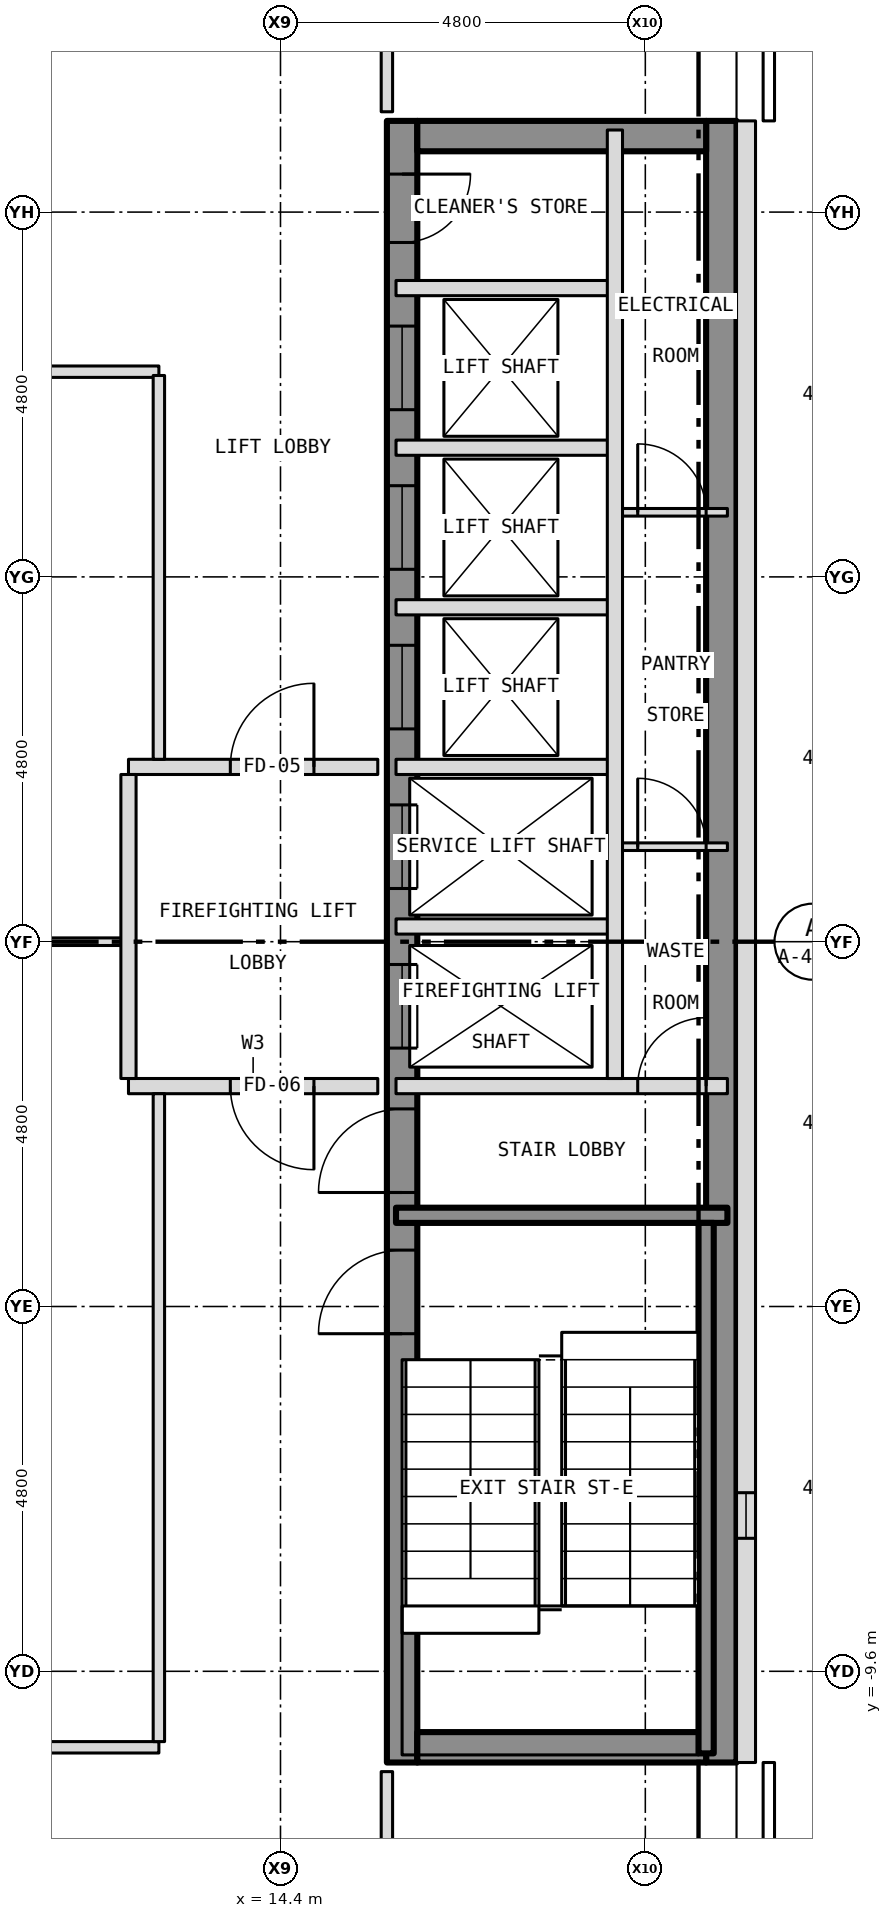
"""IFC4 building model, lengths in metres.
Left out: names, types, materials, properties, quantities, classifications, styles, units other than length and angle.
Written with IfcOpenShell. Run it as: python <this file> out.ifc"""

import sys

from ifc_helpers import new_model, si_unit, direction, frame, frame_2d, origin, place, context, subcontext, project, spatial, rectangle, extrude, element, fill, save


model = new_model("IFC4")
c1 = context("Model", 3, precision=1e-05, world=origin(), true_north=direction((0.0, 1.0)))
c2 = subcontext(c1, "Body", "Model", "MODEL_VIEW")
j1 = project(units=[si_unit("LENGTHUNIT", "METRE"), si_unit("PLANEANGLEUNIT", "RADIAN")], contexts=[c1])
p1 = place(None, origin())
s1 = spatial("IfcSite", under=j1, at=p1, CompositionType="ELEMENT")
p2 = place(p1, origin())
s2 = spatial("IfcBuilding", under=s1, at=p2, CompositionType="ELEMENT")
p3 = place(p2, frame((0.0, 0.0, 205.0)))
s3 = spatial("IfcBuildingStorey", under=s2, at=p3, CompositionType="ELEMENT", Elevation=205.0)
p4 = place(p3, frame((16.0, -10.8, 0.0), z_axis=(0.0, 0.0, 1.0), x_axis=(0.0, 1.0, 0.0)))
e1 = element("IfcWall", 1, at=p4, inside=s3, PredefinedType="SHEAR", context=c2, shape_type="SweptSolid", body=[
    extrude(rectangle(XDim=21.6, YDim=0.4, at=frame_2d((10.8, 0.0))), origin(), (0.0, 0.0, 1.0), 3.25),
])
p5 = place(p4, frame((9.4, 0.0, 0.0)))
e2 = element("IfcOpeningElement", 2, at=p5, cuts=e1, PredefinedType="OPENING", context=c2, shape_type="SweptSolid", body=[
    extrude(rectangle(XDim=1.1, YDim=2.1, at=frame_2d((0.55, 1.05))), frame((0.0, 0.212, 0.0), z_axis=(0.0, -1.0, 0.0), x_axis=(1.0, 0.0, 0.0)), (0.0, 0.0, 1.0), 0.424),
])
p6 = place(p4, frame((11.5, 0.0, 0.0)))
e3 = element("IfcOpeningElement", 3, at=p6, cuts=e1, PredefinedType="OPENING", context=c2, shape_type="SweptSolid", body=[
    extrude(rectangle(XDim=1.1, YDim=2.1, at=frame_2d((0.55, 1.05))), frame((0.0, 0.212, 0.0), z_axis=(0.0, -1.0, 0.0), x_axis=(1.0, 0.0, 0.0)), (0.0, 0.0, 1.0), 0.424),
])
p7 = place(p4, frame((13.6, 0.0, 0.0)))
e4 = element("IfcOpeningElement", 4, at=p7, cuts=e1, PredefinedType="OPENING", context=c2, shape_type="SweptSolid", body=[
    extrude(rectangle(XDim=1.1, YDim=2.1, at=frame_2d((0.55, 1.05))), frame((0.0, 0.212, 0.0), z_axis=(0.0, -1.0, 0.0), x_axis=(1.0, 0.0, 0.0)), (0.0, 0.0, 1.0), 0.424),
])
p8 = place(p4, frame((15.7, 0.0, 0.0)))
e5 = element("IfcOpeningElement", 5, at=p8, cuts=e1, PredefinedType="OPENING", context=c2, shape_type="SweptSolid", body=[
    extrude(rectangle(XDim=1.1, YDim=2.1, at=frame_2d((0.55, 1.05))), frame((0.0, 0.212, 0.0), z_axis=(0.0, -1.0, 0.0), x_axis=(1.0, 0.0, 0.0)), (0.0, 0.0, 1.0), 0.424),
])
p9 = place(p4, frame((17.8, 0.0, 0.0)))
e6 = element("IfcOpeningElement", 6, at=p9, cuts=e1, PredefinedType="OPENING", context=c2, shape_type="SweptSolid", body=[
    extrude(rectangle(XDim=1.1, YDim=2.1, at=frame_2d((0.55, 1.05))), frame((0.0, 0.212, 0.0), z_axis=(0.0, -1.0, 0.0), x_axis=(1.0, 0.0, 0.0)), (0.0, 0.0, 1.0), 0.424),
])
p10 = place(p4, frame((5.642, 0.0, 0.0)))
e7 = element("IfcOpeningElement", 7, at=p10, cuts=e1, PredefinedType="OPENING", context=c2, shape_type="SweptSolid", body=[
    extrude(rectangle(XDim=1.1, YDim=2.1, at=frame_2d((0.55, 1.05))), frame((0.0, 0.212, 0.0), z_axis=(0.0, -1.0, 0.0), x_axis=(1.0, 0.0, 0.0)), (0.0, 0.0, 1.0), 0.424),
])
p11 = place(p4, frame((7.5, 0.0, 0.0)))
e8 = element("IfcOpeningElement", 8, at=p11, cuts=e1, PredefinedType="OPENING", context=c2, shape_type="SweptSolid", body=[
    extrude(rectangle(XDim=1.1, YDim=2.1, at=frame_2d((0.55, 1.05))), frame((0.0, 0.212, 0.0), z_axis=(0.0, -1.0, 0.0), x_axis=(1.0, 0.0, 0.0)), (0.0, 0.0, 1.0), 0.424),
])
p12 = place(p4, frame((20.0, 0.0, 0.0)))
e9 = element("IfcOpeningElement", 9, at=p12, cuts=e1, PredefinedType="OPENING", context=c2, shape_type="SweptSolid", body=[
    extrude(rectangle(XDim=0.9, YDim=2.1, at=frame_2d((0.45, 1.05))), frame((0.0, 0.212, 0.0), z_axis=(0.0, -1.0, 0.0), x_axis=(1.0, 0.0, 0.0)), (0.0, 0.0, 1.0), 0.424),
])
p13 = place(p3, frame((20.2, -10.8, 0.0), z_axis=(0.0, 0.0, 1.0), x_axis=(0.0, 1.0, 0.0)))
e10 = element("IfcWall", 10, at=p13, inside=s3, PredefinedType="SHEAR", context=c2, shape_type="SweptSolid", body=[
    extrude(rectangle(XDim=21.6, YDim=0.4, at=frame_2d((10.8, 0.0))), origin(), (0.0, 0.0, 1.0), 3.25),
])
for number, where, z_axis, x_axis in (
    (11, (16.2, 10.6, 0.0), (0.0, 0.0, 1.0), (1.0, 0.0, 0.0)),
    (12, (16.2, -10.6, 0.0), (0.0, 0.0, 1.0), (1.0, 0.0, 0.0)),
):
    element("IfcWall", number, at=place(p3, frame(where, z_axis=z_axis, x_axis=x_axis)), inside=s3, PredefinedType="SHEAR", context=c2, shape_type="SweptSolid", body=[
        extrude(rectangle(XDim=3.8, YDim=0.4, at=frame_2d((1.9, 0.0))), origin(), (0.0, 0.0, 1.0), 3.25),
    ])
p14 = place(p3, frame((20.525, -10.8, 0.0), z_axis=(0.0, 0.0, 1.0), x_axis=(0.0, 1.0, 0.0)))
e13 = element("IfcWall", 13, at=p14, inside=s3, PredefinedType="SOLIDWALL", context=c2, shape_type="SweptSolid", body=[
    extrude(rectangle(XDim=21.6, YDim=0.25, at=frame_2d((10.8, 0.0))), origin(), (0.0, 0.0, 1.0), 3.5),
])
p15 = place(p14, frame((2.95, 0.0, 1.0)))
e14 = element("IfcOpeningElement", 14, at=p15, cuts=e13, PredefinedType="OPENING", context=c2, shape_type="SweptSolid", body=[
    extrude(rectangle(XDim=0.6, YDim=1.5, at=frame_2d((0.3, 0.75))), frame((0.0, 0.137, 0.0), z_axis=(0.0, -1.0, 0.0), x_axis=(1.0, 0.0, 0.0)), (0.0, 0.0, 1.0), 0.274),
])
p16 = place(p3, frame((6.3, -10.6, 0.0), z_axis=(0.0, 0.0, 1.0), x_axis=(1.0, 0.0, 0.0)))
e15 = element("IfcWall", 15, at=p16, inside=s3, PredefinedType="PARTITIONING", context=c2, shape_type="SweptSolid", body=[
    extrude(rectangle(XDim=6.5, YDim=0.15, at=frame_2d((3.25, 0.0))), origin(), (0.0, 0.0, 1.0), 3.35),
])
p17 = place(p3, frame((15.92, -3.6, 0.0), z_axis=(0.0, 0.0, 1.0), x_axis=(1.0, 0.0, 0.0)))
e16 = element("IfcWall", 16, at=p17, inside=s3, PredefinedType="SHEAR", context=c2, shape_type="SweptSolid", body=[
    extrude(rectangle(XDim=4.36, YDim=0.2, at=frame_2d((2.18, 0.0))), origin(), (0.0, 0.0, 1.0), 3.25),
])
p18 = place(p3, frame((12.4, -1.9, 0.0), z_axis=(0.0, 0.0, 1.0), x_axis=(1.0, 0.0, 0.0)))
e17 = element("IfcWall", 17, at=p18, inside=s3, PredefinedType="PARTITIONING", context=c2, shape_type="SweptSolid", body=[
    extrude(rectangle(XDim=3.28, YDim=0.2, at=frame_2d((1.64, 0.0))), origin(), (0.0, 0.0, 1.0), 3.35),
])
p19 = place(p18, frame((1.34, 0.0, 0.0)))
e18 = element("IfcOpeningElement", 18, at=p19, cuts=e17, PredefinedType="OPENING", context=c2, shape_type="SweptSolid", body=[
    extrude(rectangle(XDim=1.1, YDim=2.1, at=frame_2d((0.55, 1.05))), frame((0.0, 0.112, 0.0), z_axis=(0.0, -1.0, 0.0), x_axis=(1.0, 0.0, 0.0)), (0.0, 0.0, 1.0), 0.224),
])
p20 = place(p3, frame((15.92, -1.9, 0.0), z_axis=(0.0, 0.0, 1.0), x_axis=(1.0, 0.0, 0.0)))
e19 = element("IfcWall", 19, at=p20, inside=s3, PredefinedType="PARTITIONING", context=c2, shape_type="SweptSolid", body=[
    extrude(rectangle(XDim=4.36, YDim=0.2, at=frame_2d((2.18, 0.0))), origin(), (0.0, 0.0, 1.0), 3.25),
])
p21 = place(p20, frame((3.18, 0.0, 0.0)))
e20 = element("IfcOpeningElement", 20, at=p21, cuts=e19, PredefinedType="OPENING", context=c2, shape_type="SweptSolid", body=[
    extrude(rectangle(XDim=0.9, YDim=2.1, at=frame_2d((0.45, 1.05))), frame((0.0, 0.112, 0.0), z_axis=(0.0, -1.0, 0.0), x_axis=(1.0, 0.0, 0.0)), (0.0, 0.0, 1.0), 0.224),
])
p22 = place(p3, frame((9.787, 0.0, 0.0), z_axis=(0.0, 0.0, 1.0), x_axis=(1.0, 0.0, 0.0)))
e21 = element("IfcWall", 21, at=p22, inside=s3, PredefinedType="PARTITIONING", context=c2, shape_type="SweptSolid", body=[
    extrude(rectangle(XDim=2.613, YDim=0.1, at=frame_2d((1.306, 0.0))), origin(), (0.0, 0.0, 1.0), 2.728),
])
p23 = place(p3, frame((15.92, 0.2, 0.0), z_axis=(0.0, 0.0, 1.0), x_axis=(1.0, 0.0, 0.0)))
e22 = element("IfcWall", 22, at=p23, inside=s3, PredefinedType="PARTITIONING", context=c2, shape_type="SweptSolid", body=[
    extrude(rectangle(XDim=2.88, YDim=0.2, at=frame_2d((1.44, 0.0))), origin(), (0.0, 0.0, 1.0), 3.25),
])
p24 = place(p3, frame((18.8, 1.25, 0.0), z_axis=(0.0, 0.0, 1.0), x_axis=(1.0, 0.0, 0.0)))
e23 = element("IfcWall", 23, at=p24, inside=s3, PredefinedType="PARTITIONING", context=c2, shape_type="SweptSolid", body=[
    extrude(rectangle(XDim=1.48, YDim=0.1, at=frame_2d((0.74, 0.0))), origin(), (0.0, 0.0, 1.0), 3.25),
])
p25 = place(p24, frame((0.3, 0.0, 0.0)))
e24 = element("IfcOpeningElement", 24, at=p25, cuts=e23, PredefinedType="OPENING", context=c2, shape_type="SweptSolid", body=[
    extrude(rectangle(XDim=0.9, YDim=2.1, at=frame_2d((0.45, 1.05))), frame((0.0, 0.062, 0.0), z_axis=(0.0, -1.0, 0.0), x_axis=(1.0, 0.0, 0.0)), (0.0, 0.0, 1.0), 0.124),
])
p26 = place(p3, frame((12.4, 2.3, 0.0), z_axis=(0.0, 0.0, 1.0), x_axis=(1.0, 0.0, 0.0)))
e25 = element("IfcWall", 25, at=p26, inside=s3, PredefinedType="PARTITIONING", context=c2, shape_type="SweptSolid", body=[
    extrude(rectangle(XDim=3.28, YDim=0.2, at=frame_2d((1.64, 0.0))), origin(), (0.0, 0.0, 1.0), 3.35),
])
p27 = place(p26, frame((1.34, 0.0, 0.0)))
e26 = element("IfcOpeningElement", 26, at=p27, cuts=e25, PredefinedType="OPENING", context=c2, shape_type="SweptSolid", body=[
    extrude(rectangle(XDim=1.1, YDim=2.1, at=frame_2d((0.55, 1.05))), frame((0.0, 0.112, 0.0), z_axis=(0.0, -1.0, 0.0), x_axis=(1.0, 0.0, 0.0)), (0.0, 0.0, 1.0), 0.224),
])
for number, where, z_axis, x_axis in (
    (27, (15.92, 2.3, 0.0), (0.0, 0.0, 1.0), (1.0, 0.0, 0.0)),
    (28, (15.92, 4.4, 0.0), (0.0, 0.0, 1.0), (1.0, 0.0, 0.0)),
):
    element("IfcWall", number, at=place(p3, frame(where, z_axis=z_axis, x_axis=x_axis)), inside=s3, PredefinedType="PARTITIONING", context=c2, shape_type="SweptSolid", body=[
        extrude(rectangle(XDim=2.88, YDim=0.2, at=frame_2d((1.44, 0.0))), origin(), (0.0, 0.0, 1.0), 3.25),
    ])
p28 = place(p3, frame((18.8, 5.65, 0.0), z_axis=(0.0, 0.0, 1.0), x_axis=(1.0, 0.0, 0.0)))
e29 = element("IfcWall", 29, at=p28, inside=s3, PredefinedType="PARTITIONING", context=c2, shape_type="SweptSolid", body=[
    extrude(rectangle(XDim=1.48, YDim=0.1, at=frame_2d((0.74, 0.0))), origin(), (0.0, 0.0, 1.0), 3.25),
])
p29 = place(p28, frame((0.3, 0.0, 0.0)))
e30 = element("IfcOpeningElement", 30, at=p29, cuts=e29, PredefinedType="OPENING", context=c2, shape_type="SweptSolid", body=[
    extrude(rectangle(XDim=0.9, YDim=2.1, at=frame_2d((0.45, 1.05))), frame((0.0, 0.062, 0.0), z_axis=(0.0, -1.0, 0.0), x_axis=(1.0, 0.0, 0.0)), (0.0, 0.0, 1.0), 0.124),
])
p30 = place(p3, frame((15.92, 6.5, 0.0), z_axis=(0.0, 0.0, 1.0), x_axis=(1.0, 0.0, 0.0)))
e31 = element("IfcWall", 31, at=p30, inside=s3, PredefinedType="PARTITIONING", context=c2, shape_type="SweptSolid", body=[
    extrude(rectangle(XDim=2.88, YDim=0.2, at=frame_2d((1.44, 0.0))), origin(), (0.0, 0.0, 1.0), 3.25),
])
p31 = place(p3, frame((6.3, 7.5, 0.0), z_axis=(0.0, 0.0, 1.0), x_axis=(1.0, 0.0, 0.0)))
e32 = element("IfcWall", 32, at=p31, inside=s3, PredefinedType="PARTITIONING", context=c2, shape_type="SweptSolid", body=[
    extrude(rectangle(XDim=6.5, YDim=0.15, at=frame_2d((3.25, 0.0))), origin(), (0.0, 0.0, 1.0), 3.35),
])
p32 = place(p3, frame((15.92, 8.6, 0.0), z_axis=(0.0, 0.0, 1.0), x_axis=(1.0, 0.0, 0.0)))
e33 = element("IfcWall", 33, at=p32, inside=s3, PredefinedType="PARTITIONING", context=c2, shape_type="SweptSolid", body=[
    extrude(rectangle(XDim=2.88, YDim=0.2, at=frame_2d((1.44, 0.0))), origin(), (0.0, 0.0, 1.0), 3.25),
])
p33 = place(p3, frame((12.4, -1.8, 0.0), z_axis=(0.0, 0.0, 1.0), x_axis=(0.0, 1.0, 0.0)))
e34 = element("IfcWall", 34, at=p33, inside=s3, PredefinedType="PARTITIONING", context=c2, shape_type="SweptSolid", body=[
    extrude(rectangle(XDim=4.0, YDim=0.2, at=frame_2d((2.0, 0.0))), origin(), (0.0, 0.0, 1.0), 3.35),
])
p34 = place(p3, frame((12.8, -10.525, 0.0), z_axis=(0.0, 0.0, 1.0), x_axis=(0.0, 1.0, 0.0)))
e35 = element("IfcWall", 35, at=p34, inside=s3, PredefinedType="PARTITIONING", context=c2, shape_type="SweptSolid", body=[
    extrude(rectangle(XDim=8.525, YDim=0.15, at=frame_2d((4.262, 0.0))), origin(), (0.0, 0.0, 1.0), 3.35),
])
p35 = place(p3, frame((12.8, 2.4, 0.0), z_axis=(0.0, 0.0, 1.0), x_axis=(0.0, 1.0, 0.0)))
e36 = element("IfcWall", 36, at=p35, inside=s3, PredefinedType="PARTITIONING", context=c2, shape_type="SweptSolid", body=[
    extrude(rectangle(XDim=5.05, YDim=0.15, at=frame_2d((2.525, 0.0))), origin(), (0.0, 0.0, 1.0), 3.35),
])
for number, where, z_axis, x_axis in (
    (37, (15.8, -12.725, 0.0), (0.0, 0.0, 1.0), (0.0, 1.0, 0.0)),
    (38, (15.8, 10.92, 0.0), (0.0, 0.0, 1.0), (0.0, 1.0, 0.0)),
):
    element("IfcWall", number, at=place(p3, frame(where, z_axis=z_axis, x_axis=x_axis)), inside=s3, PredefinedType="PARTITIONING", context=c2, shape_type="SweptSolid", body=[
        extrude(rectangle(XDim=1.805, YDim=0.15, at=frame_2d((0.903, 0.0))), origin(), (0.0, 0.0, 1.0), 3.35),
    ])
p36 = place(p3, frame((18.8, -1.8, 0.0), z_axis=(0.0, 0.0, 1.0), x_axis=(0.0, 1.0, 0.0)))
e39 = element("IfcWall", 39, at=p36, inside=s3, PredefinedType="PARTITIONING", context=c2, shape_type="SweptSolid", body=[
    extrude(rectangle(XDim=12.48, YDim=0.2, at=frame_2d((6.24, 0.0))), origin(), (0.0, 0.0, 1.0), 3.25),
])
p37 = place(p3, frame((20.0, -10.68, 0.0), z_axis=(0.0, 0.0, 1.0), x_axis=(0.0, 1.0, 0.0)))
e40 = element("IfcWall", 40, at=p37, inside=s3, PredefinedType="SHEAR", context=c2, shape_type="SweptSolid", body=[
    extrude(rectangle(XDim=6.98, YDim=0.2, at=frame_2d((3.49, 0.0))), origin(), (0.0, 0.0, 1.0), 3.25),
])
p38 = place(p15, origin())
e41 = element("IfcWindow", 41, at=p38, inside=s3, PartitioningType="SINGLE_PANEL", PredefinedType="WINDOW", context=c2, shape_type="SweptSolid", body=[
    extrude(rectangle(XDim=0.6, YDim=1.5, at=frame_2d((0.3, 0.75))), frame((0.0, -0.035, 0.0), z_axis=(0.0, -1.0, 0.0), x_axis=(1.0, 0.0, 0.0)), (0.0, 0.0, 1.0), 0.06),
])
fill(e14, e41)
p39 = place(p5, origin())
e42 = element("IfcDoor", 42, at=p39, inside=s3, OperationType="SLIDING_TO_LEFT", PredefinedType="DOOR", context=c2, shape_type="SweptSolid", body=[
    extrude(rectangle(XDim=1.1, YDim=2.1, at=frame_2d((0.55, 1.05))), frame((0.0, 0.025, 0.0), z_axis=(0.0, -1.0, 0.0), x_axis=(1.0, 0.0, 0.0)), (0.0, 0.0, 1.0), 0.05),
])
fill(e2, e42)
p40 = place(p6, origin())
e43 = element("IfcDoor", 43, at=p40, inside=s3, OperationType="SLIDING_TO_LEFT", PredefinedType="DOOR", context=c2, shape_type="SweptSolid", body=[
    extrude(rectangle(XDim=1.1, YDim=2.1, at=frame_2d((0.55, 1.05))), frame((0.0, 0.025, 0.0), z_axis=(0.0, -1.0, 0.0), x_axis=(1.0, 0.0, 0.0)), (0.0, 0.0, 1.0), 0.05),
])
fill(e3, e43)
p41 = place(p7, origin())
e44 = element("IfcDoor", 44, at=p41, inside=s3, OperationType="SLIDING_TO_LEFT", PredefinedType="DOOR", context=c2, shape_type="SweptSolid", body=[
    extrude(rectangle(XDim=1.1, YDim=2.1, at=frame_2d((0.55, 1.05))), frame((0.0, 0.025, 0.0), z_axis=(0.0, -1.0, 0.0), x_axis=(1.0, 0.0, 0.0)), (0.0, 0.0, 1.0), 0.05),
])
fill(e4, e44)
p42 = place(p8, origin())
e45 = element("IfcDoor", 45, at=p42, inside=s3, OperationType="SLIDING_TO_LEFT", PredefinedType="DOOR", context=c2, shape_type="SweptSolid", body=[
    extrude(rectangle(XDim=1.1, YDim=2.1, at=frame_2d((0.55, 1.05))), frame((0.0, 0.025, 0.0), z_axis=(0.0, -1.0, 0.0), x_axis=(1.0, 0.0, 0.0)), (0.0, 0.0, 1.0), 0.05),
])
fill(e5, e45)
p43 = place(p9, origin())
e46 = element("IfcDoor", 46, at=p43, inside=s3, OperationType="SLIDING_TO_LEFT", PredefinedType="DOOR", context=c2, shape_type="SweptSolid", body=[
    extrude(rectangle(XDim=1.1, YDim=2.1, at=frame_2d((0.55, 1.05))), frame((0.0, 0.025, 0.0), z_axis=(0.0, -1.0, 0.0), x_axis=(1.0, 0.0, 0.0)), (0.0, 0.0, 1.0), 0.05),
])
fill(e6, e46)
p44 = place(p10, origin())
e47 = element("IfcDoor", 47, at=p44, inside=s3, OperationType="SINGLE_SWING_LEFT", PredefinedType="DOOR", context=c2, shape_type="SweptSolid", body=[
    extrude(rectangle(XDim=1.1, YDim=2.1, at=frame_2d((0.55, 1.05))), frame((0.0, 0.025, 0.0), z_axis=(0.0, -1.0, 0.0), x_axis=(1.0, 0.0, 0.0)), (0.0, 0.0, 1.0), 0.05),
])
fill(e7, e47)
p45 = place(p11, origin())
e48 = element("IfcDoor", 48, at=p45, inside=s3, OperationType="SINGLE_SWING_LEFT", PredefinedType="DOOR", context=c2, shape_type="SweptSolid", body=[
    extrude(rectangle(XDim=1.1, YDim=2.1, at=frame_2d((0.55, 1.05))), frame((0.0, 0.025, 0.0), z_axis=(0.0, -1.0, 0.0), x_axis=(1.0, 0.0, 0.0)), (0.0, 0.0, 1.0), 0.05),
])
fill(e8, e48)
p46 = place(p12, origin())
e49 = element("IfcDoor", 49, at=p46, inside=s3, OperationType="SINGLE_SWING_RIGHT", PredefinedType="DOOR", context=c2, shape_type="SweptSolid", body=[
    extrude(rectangle(XDim=0.9, YDim=2.1, at=frame_2d((0.45, 1.05))), frame((0.0, 0.025, 0.0), z_axis=(0.0, -1.0, 0.0), x_axis=(1.0, 0.0, 0.0)), (0.0, 0.0, 1.0), 0.05),
])
fill(e9, e49)
p47 = place(p21, origin())
e50 = element("IfcDoor", 50, at=p47, inside=s3, OperationType="SINGLE_SWING_RIGHT", PredefinedType="DOOR", context=c2, shape_type="SweptSolid", body=[
    extrude(rectangle(XDim=0.9, YDim=2.1, at=frame_2d((0.45, 1.05))), frame((0.0, 0.025, 0.0), z_axis=(0.0, -1.0, 0.0), x_axis=(1.0, 0.0, 0.0)), (0.0, 0.0, 1.0), 0.05),
])
fill(e20, e50)
p48 = place(p25, origin())
e51 = element("IfcDoor", 51, at=p48, inside=s3, OperationType="SINGLE_SWING_LEFT", PredefinedType="DOOR", context=c2, shape_type="SweptSolid", body=[
    extrude(rectangle(XDim=0.9, YDim=2.1, at=frame_2d((0.45, 1.05))), frame((0.0, 0.025, 0.0), z_axis=(0.0, -1.0, 0.0), x_axis=(1.0, 0.0, 0.0)), (0.0, 0.0, 1.0), 0.05),
])
fill(e24, e51)
p49 = place(p29, origin())
e52 = element("IfcDoor", 52, at=p49, inside=s3, OperationType="SINGLE_SWING_LEFT", PredefinedType="DOOR", context=c2, shape_type="SweptSolid", body=[
    extrude(rectangle(XDim=0.9, YDim=2.1, at=frame_2d((0.45, 1.05))), frame((0.0, 0.025, 0.0), z_axis=(0.0, -1.0, 0.0), x_axis=(1.0, 0.0, 0.0)), (0.0, 0.0, 1.0), 0.05),
])
fill(e30, e52)
p50 = place(p27, origin())
e53 = element("IfcDoor", 53, at=p50, inside=s3, OperationType="SINGLE_SWING_RIGHT", PredefinedType="DOOR", context=c2, shape_type="SweptSolid", body=[
    extrude(rectangle(XDim=1.1, YDim=2.1, at=frame_2d((0.55, 1.05))), frame((0.0, 0.025, 0.0), z_axis=(0.0, -1.0, 0.0), x_axis=(1.0, 0.0, 0.0)), (0.0, 0.0, 1.0), 0.05),
])
fill(e26, e53)
p51 = place(p19, origin())
e54 = element("IfcDoor", 54, at=p51, inside=s3, OperationType="SINGLE_SWING_RIGHT", PredefinedType="DOOR", context=c2, shape_type="SweptSolid", body=[
    extrude(rectangle(XDim=1.1, YDim=2.1, at=frame_2d((0.55, 1.05))), frame((0.0, 0.025, 0.0), z_axis=(0.0, -1.0, 0.0), x_axis=(1.0, 0.0, 0.0)), (0.0, 0.0, 1.0), 0.05),
])
fill(e18, e54)
save(model, sys.argv[1])
